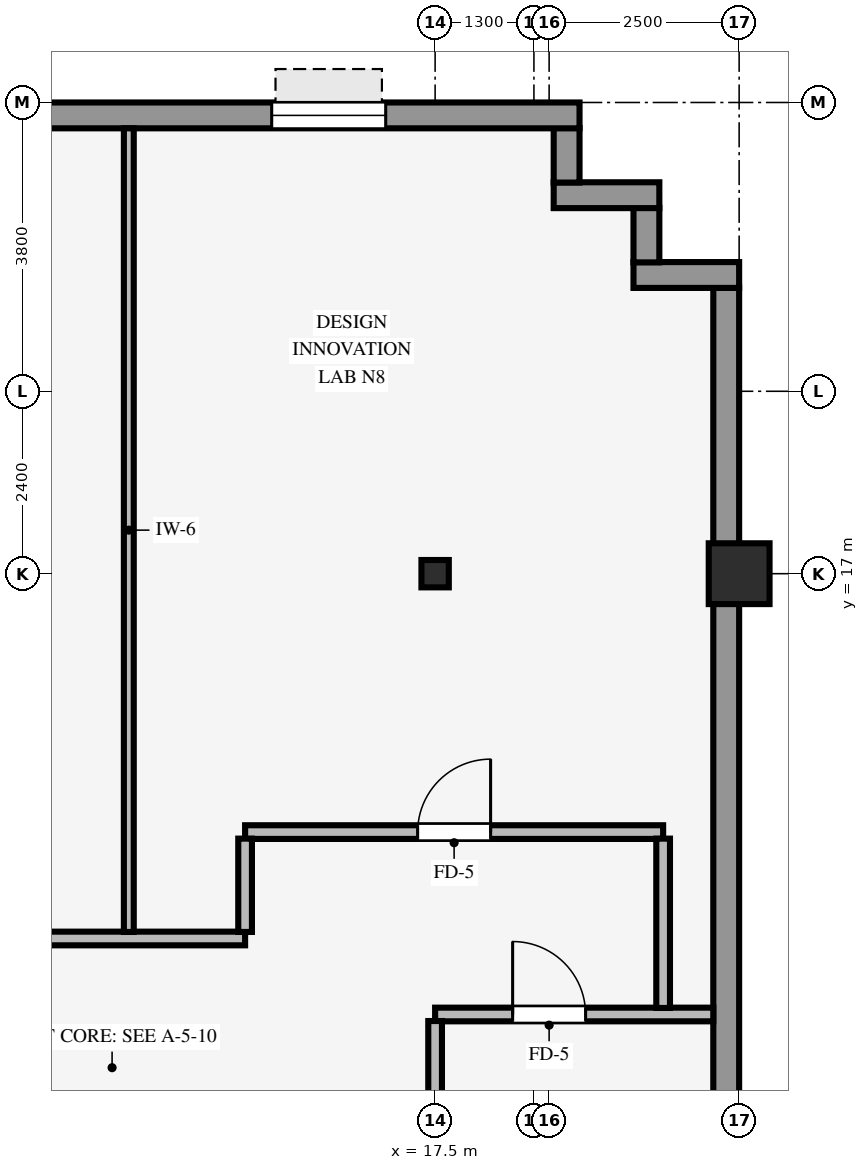
"""IFC4 building model, lengths in metres.
Left out: names, types, materials, properties, quantities, classifications, styles, units other than length and angle.
Written with IfcOpenShell. Run it as: python <this file> out.ifc"""

import sys

from ifc_helpers import new_model, si_unit, direction, frame, frame_2d, origin, origin_2d, place, context, subcontext, project, spatial, rectangle, hollow_rectangle, i_section, extrude, source, transform, mapped, element, fill, save


model = new_model("IFC4")
c1 = context("Model", 3, precision=1e-05, world=origin(), true_north=direction((0.0, 1.0)))
c2 = subcontext(c1, "Body", "Model", "MODEL_VIEW")
j1 = project(units=[si_unit("LENGTHUNIT", "METRE"), si_unit("PLANEANGLEUNIT", "RADIAN")], contexts=[c1])
p1 = place(None, origin())
s1 = spatial("IfcSite", under=j1, at=p1, CompositionType="ELEMENT")
p2 = place(p1, origin())
s2 = spatial("IfcBuilding", under=s1, at=p2, CompositionType="ELEMENT")
p3 = place(p2, frame((0.0, 0.0, 64.1)))
s3 = spatial("IfcBuildingStorey", under=s2, at=p3, CompositionType="ELEMENT", Elevation=64.1)
p4 = place(p3, frame((21.5, 17.0, 0.0), z_axis=(0.0, 0.0, 1.0), x_axis=(1.0, 0.0, 0.0)))
e1 = element("IfcColumn", 1, at=p4, inside=s3, PredefinedType="COLUMN", context=c2, shape_type="SweptSolid", body=[
    extrude(hollow_rectangle(XDim=0.8, YDim=0.8, WallThickness=0.055, InnerFilletRadius=0.055, OuterFilletRadius=0.11, at=origin_2d()), origin(), (0.0, 0.0, 1.0), 3.37),
])
p5 = place(p3, frame((17.5, 17.0, 0.0), z_axis=(0.0, 0.0, 1.0), x_axis=(1.0, 0.0, 0.0)))
e2 = element("IfcColumn", 2, at=p5, inside=s3, PredefinedType="COLUMN", context=c2, shape_type="SweptSolid", body=[
    extrude(i_section(OverallWidth=0.36, OverallDepth=0.36, WebThickness=0.021, FlangeThickness=0.021, FilletRadius=0.018, at=origin_2d()), origin(), (0.0, 0.0, 1.0), 3.37),
])
p6 = place(p3, frame((21.33, -20.764, 0.0), z_axis=(0.0, 0.0, 1.0), x_axis=(0.0, 1.0, 0.0)))
e3 = element("IfcWall", 3, at=p6, inside=s3, PredefinedType="STANDARD", context=c2, shape_type="SweptSolid", body=[
    extrude(rectangle(XDim=41.528, YDim=0.34, at=frame_2d((20.764, 0.0))), origin(), (0.0, 0.0, 1.0), 2.705),
])
p7 = place(p6, frame((12.202, 0.0, 0.8)))
e4 = element("IfcOpeningElement", 4, at=p7, cuts=e3, PredefinedType="OPENING", context=c2, shape_type="SweptSolid", body=[
    extrude(rectangle(XDim=2.3, YDim=1.62, at=frame_2d((1.15, 0.81))), frame((0.0, 0.18, 0.0), z_axis=(0.0, -1.0, 0.0), x_axis=(1.0, 0.0, 0.0)), (0.0, 0.0, 1.0), 0.36),
])
p8 = place(p6, frame((17.144, 0.0, 0.8)))
e5 = element("IfcOpeningElement", 5, at=p8, cuts=e3, PredefinedType="OPENING", context=c2, shape_type="SweptSolid", body=[
    extrude(rectangle(XDim=2.3, YDim=1.62, at=frame_2d((1.15, 0.81))), frame((0.0, 0.18, 0.0), z_axis=(0.0, -1.0, 0.0), x_axis=(1.0, 0.0, 0.0)), (0.0, 0.0, 1.0), 0.36),
])
p9 = place(p6, frame((22.084, 0.0, 0.8)))
e6 = element("IfcOpeningElement", 6, at=p9, cuts=e3, PredefinedType="OPENING", context=c2, shape_type="SweptSolid", body=[
    extrude(rectangle(XDim=2.3, YDim=1.62, at=frame_2d((1.15, 0.81))), frame((0.0, 0.18, 0.0), z_axis=(0.0, -1.0, 0.0), x_axis=(1.0, 0.0, 0.0)), (0.0, 0.0, 1.0), 0.36),
])
p10 = place(p6, frame((27.025, 0.0, 0.8)))
e7 = element("IfcOpeningElement", 7, at=p10, cuts=e3, PredefinedType="OPENING", context=c2, shape_type="SweptSolid", body=[
    extrude(rectangle(XDim=2.3, YDim=1.62, at=frame_2d((1.15, 0.81))), frame((0.0, 0.18, 0.0), z_axis=(0.0, -1.0, 0.0), x_axis=(1.0, 0.0, 0.0)), (0.0, 0.0, 1.0), 0.36),
])
p11 = place(p3, frame((20.11, 20.93, 0.0), z_axis=(0.0, 0.0, 1.0), x_axis=(1.0, 0.0, 0.0)))
e8 = element("IfcWall", 8, at=p11, inside=s3, PredefinedType="STANDARD", context=c2, shape_type="SweptSolid", body=[
    extrude(rectangle(XDim=1.39, YDim=0.34, at=frame_2d((0.695, 0.0))), origin(), (0.0, 0.0, 1.0), 3.36),
])
p12 = place(p3, frame((20.28, 21.096, 0.0), z_axis=(0.0, 0.0, 1.0), x_axis=(0.0, 1.0, 0.0)))
e9 = element("IfcWall", 9, at=p12, inside=s3, PredefinedType="STANDARD", context=c2, shape_type="SweptSolid", body=[
    extrude(rectangle(XDim=0.718, YDim=0.34, at=frame_2d((0.359, 0.0))), origin(), (0.0, 0.0, 1.0), 3.36),
])
p13 = place(p3, frame((19.06, 21.98, 0.0), z_axis=(0.0, 0.0, 1.0), x_axis=(1.0, 0.0, 0.0)))
e10 = element("IfcWall", 10, at=p13, inside=s3, PredefinedType="STANDARD", context=c2, shape_type="SweptSolid", body=[
    extrude(rectangle(XDim=1.39, YDim=0.34, at=frame_2d((0.695, 0.0))), origin(), (0.0, 0.0, 1.0), 3.36),
])
p14 = place(p3, frame((19.23, 22.146, 0.0), z_axis=(0.0, 0.0, 1.0), x_axis=(0.0, 1.0, 0.0)))
e11 = element("IfcWall", 11, at=p14, inside=s3, PredefinedType="STANDARD", context=c2, shape_type="SweptSolid", body=[
    extrude(rectangle(XDim=0.718, YDim=0.34, at=frame_2d((0.359, 0.0))), origin(), (0.0, 0.0, 1.0), 3.36),
])
p15 = place(p3, frame((-19.4, 23.03, 0.0), z_axis=(0.0, 0.0, 1.0), x_axis=(1.0, 0.0, 0.0)))
e12 = element("IfcWall", 12, at=p15, inside=s3, PredefinedType="STANDARD", context=c2, shape_type="SweptSolid", body=[
    extrude(rectangle(XDim=38.8, YDim=0.34, at=frame_2d((19.4, 0.0))), origin(), (0.0, 0.0, 1.0), 2.705),
])
p16 = place(p15, frame((1.65, 0.0, 0.8)))
e13 = element("IfcOpeningElement", 13, at=p16, cuts=e12, PredefinedType="OPENING", context=c2, shape_type="SweptSolid", body=[
    extrude(rectangle(XDim=1.5, YDim=1.6, at=frame_2d((0.75, 0.8))), frame((0.0, 0.18, 0.0), z_axis=(0.0, -1.0, 0.0), x_axis=(1.0, 0.0, 0.0)), (0.0, 0.0, 1.0), 0.36),
])
p17 = place(p15, frame((7.15, 0.0, 0.8)))
e14 = element("IfcOpeningElement", 14, at=p17, cuts=e12, PredefinedType="OPENING", context=c2, shape_type="SweptSolid", body=[
    extrude(rectangle(XDim=1.5, YDim=1.6, at=frame_2d((0.75, 0.8))), frame((0.0, 0.18, 0.0), z_axis=(0.0, -1.0, 0.0), x_axis=(1.0, 0.0, 0.0)), (0.0, 0.0, 1.0), 0.36),
])
p18 = place(p15, frame((11.75, 0.0, 0.8)))
e15 = element("IfcOpeningElement", 15, at=p18, cuts=e12, PredefinedType="OPENING", context=c2, shape_type="SweptSolid", body=[
    extrude(rectangle(XDim=1.5, YDim=1.6, at=frame_2d((0.75, 0.8))), frame((0.0, 0.18, 0.0), z_axis=(0.0, -1.0, 0.0), x_axis=(1.0, 0.0, 0.0)), (0.0, 0.0, 1.0), 0.36),
])
p19 = place(p15, frame((16.35, 0.0, 0.8)))
e16 = element("IfcOpeningElement", 16, at=p19, cuts=e12, PredefinedType="OPENING", context=c2, shape_type="SweptSolid", body=[
    extrude(rectangle(XDim=1.5, YDim=1.6, at=frame_2d((0.75, 0.8))), frame((0.0, 0.18, 0.0), z_axis=(0.0, -1.0, 0.0), x_axis=(1.0, 0.0, 0.0)), (0.0, 0.0, 1.0), 0.36),
])
p20 = place(p15, frame((20.95, 0.0, 0.8)))
e17 = element("IfcOpeningElement", 17, at=p20, cuts=e12, PredefinedType="OPENING", context=c2, shape_type="SweptSolid", body=[
    extrude(rectangle(XDim=1.5, YDim=1.6, at=frame_2d((0.75, 0.8))), frame((0.0, 0.18, 0.0), z_axis=(0.0, -1.0, 0.0), x_axis=(1.0, 0.0, 0.0)), (0.0, 0.0, 1.0), 0.36),
])
p21 = place(p15, frame((25.55, 0.0, 0.8)))
e18 = element("IfcOpeningElement", 18, at=p21, cuts=e12, PredefinedType="OPENING", context=c2, shape_type="SweptSolid", body=[
    extrude(rectangle(XDim=1.5, YDim=1.6, at=frame_2d((0.75, 0.8))), frame((0.0, 0.18, 0.0), z_axis=(0.0, -1.0, 0.0), x_axis=(1.0, 0.0, 0.0)), (0.0, 0.0, 1.0), 0.36),
])
p22 = place(p15, frame((30.15, 0.0, 0.8)))
e19 = element("IfcOpeningElement", 19, at=p22, cuts=e12, PredefinedType="OPENING", context=c2, shape_type="SweptSolid", body=[
    extrude(rectangle(XDim=1.5, YDim=1.6, at=frame_2d((0.75, 0.8))), frame((0.0, 0.18, 0.0), z_axis=(0.0, -1.0, 0.0), x_axis=(1.0, 0.0, 0.0)), (0.0, 0.0, 1.0), 0.36),
])
p23 = place(p15, frame((34.75, 0.0, 0.8)))
e20 = element("IfcOpeningElement", 20, at=p23, cuts=e12, PredefinedType="OPENING", context=c2, shape_type="SweptSolid", body=[
    extrude(rectangle(XDim=1.5, YDim=1.6, at=frame_2d((0.75, 0.8))), frame((0.0, 0.18, 0.0), z_axis=(0.0, -1.0, 0.0), x_axis=(1.0, 0.0, 0.0)), (0.0, 0.0, 1.0), 0.36),
])
p24 = place(p3, frame((17.5, 11.2, 0.0), z_axis=(0.0, 0.0, 1.0), x_axis=(1.0, 0.0, 0.0)))
e21 = element("IfcWall", 21, at=p24, inside=s3, PredefinedType="PARTITIONING", context=c2, shape_type="SweptSolid", body=[
    extrude(rectangle(XDim=3.66, YDim=0.18, at=frame_2d((1.83, 0.0))), origin(), (0.0, 0.0, 1.0), 3.36),
])
p25 = place(p24, frame((1.02, 0.0, 0.0)))
e22 = element("IfcOpeningElement", 22, at=p25, cuts=e21, PredefinedType="OPENING", context=c2, shape_type="SweptSolid", body=[
    extrude(rectangle(XDim=0.96, YDim=2.1, at=frame_2d((0.48, 1.05))), frame((0.0, 0.1, 0.0), z_axis=(0.0, -1.0, 0.0), x_axis=(1.0, 0.0, 0.0)), (0.0, 0.0, 1.0), 0.2),
])
p26 = place(p3, frame((-15.0, 12.2, 0.0), z_axis=(0.0, 0.0, 1.0), x_axis=(1.0, 0.0, 0.0)))
e23 = element("IfcWall", 23, at=p26, inside=s3, PredefinedType="PARTITIONING", context=c2, shape_type="SweptSolid", body=[
    extrude(rectangle(XDim=30.0, YDim=0.18, at=frame_2d((15.0, 0.0))), origin(), (0.0, 0.0, 1.0), 3.36),
])
p27 = place(p26, frame((2.195, 0.0, 0.0)))
e24 = element("IfcOpeningElement", 24, at=p27, cuts=e23, PredefinedType="OPENING", context=c2, shape_type="SweptSolid", body=[
    extrude(rectangle(XDim=0.96, YDim=2.1, at=frame_2d((0.48, 1.05))), frame((0.0, 0.1, 0.0), z_axis=(0.0, -1.0, 0.0), x_axis=(1.0, 0.0, 0.0)), (0.0, 0.0, 1.0), 0.2),
])
p28 = place(p26, frame((16.395, 0.0, 0.0)))
e25 = element("IfcOpeningElement", 25, at=p28, cuts=e23, PredefinedType="OPENING", context=c2, shape_type="SweptSolid", body=[
    extrude(rectangle(XDim=0.96, YDim=2.1, at=frame_2d((0.48, 1.05))), frame((0.0, 0.1, 0.0), z_axis=(0.0, -1.0, 0.0), x_axis=(1.0, 0.0, 0.0)), (0.0, 0.0, 1.0), 0.2),
])
p29 = place(p26, frame((21.62, 0.0, 0.0)))
e26 = element("IfcOpeningElement", 26, at=p29, cuts=e23, PredefinedType="OPENING", context=c2, shape_type="SweptSolid", body=[
    extrude(rectangle(XDim=0.96, YDim=2.1, at=frame_2d((0.48, 1.05))), frame((0.0, 0.1, 0.0), z_axis=(0.0, -1.0, 0.0), x_axis=(1.0, 0.0, 0.0)), (0.0, 0.0, 1.0), 0.2),
])
p30 = place(p26, frame((7.33, 0.0, 0.0)))
e27 = element("IfcOpeningElement", 27, at=p30, cuts=e23, PredefinedType="OPENING", context=c2, shape_type="SweptSolid", body=[
    extrude(rectangle(XDim=0.96, YDim=2.1, at=frame_2d((0.48, 1.05))), frame((0.0, 0.1, 0.0), z_axis=(0.0, -1.0, 0.0), x_axis=(1.0, 0.0, 0.0)), (0.0, 0.0, 1.0), 0.2),
])
p31 = place(p26, frame((26.08, 0.0, 0.0)))
e28 = element("IfcOpeningElement", 28, at=p31, cuts=e23, PredefinedType="OPENING", context=c2, shape_type="SweptSolid", body=[
    extrude(rectangle(XDim=0.96, YDim=2.1, at=frame_2d((0.48, 1.05))), frame((0.0, 0.1, 0.0), z_axis=(0.0, -1.0, 0.0), x_axis=(1.0, 0.0, 0.0)), (0.0, 0.0, 1.0), 0.2),
])
p32 = place(p26, frame((12.52, 0.0, 0.0)))
e29 = element("IfcOpeningElement", 29, at=p32, cuts=e23, PredefinedType="OPENING", context=c2, shape_type="SweptSolid", body=[
    extrude(rectangle(XDim=0.96, YDim=2.1, at=frame_2d((0.48, 1.05))), frame((0.0, 0.1, 0.0), z_axis=(0.0, -1.0, 0.0), x_axis=(1.0, 0.0, 0.0)), (0.0, 0.0, 1.0), 0.2),
])
p33 = place(p3, frame((15.0, 13.6, 0.0), z_axis=(0.0, 0.0, 1.0), x_axis=(1.0, 0.0, 0.0)))
e30 = element("IfcWall", 30, at=p33, inside=s3, PredefinedType="PARTITIONING", context=c2, shape_type="SweptSolid", body=[
    extrude(rectangle(XDim=5.5, YDim=0.18, at=frame_2d((2.75, 0.0))), origin(), (0.0, 0.0, 1.0), 2.942),
])
p34 = place(p33, frame((2.27, 0.0, 0.0)))
e31 = element("IfcOpeningElement", 31, at=p34, cuts=e30, PredefinedType="OPENING", context=c2, shape_type="SweptSolid", body=[
    extrude(rectangle(XDim=0.96, YDim=2.1, at=frame_2d((0.48, 1.05))), frame((0.0, 0.1, 0.0), z_axis=(0.0, -1.0, 0.0), x_axis=(1.0, 0.0, 0.0)), (0.0, 0.0, 1.0), 0.2),
])
p35 = place(p3, frame((13.47, 12.286, 0.0), z_axis=(0.0, 0.0, 1.0), x_axis=(0.0, 1.0, 0.0)))
e32 = element("IfcWall", 32, at=p35, inside=s3, PredefinedType="PARTITIONING", context=c2, shape_type="SweptSolid", body=[
    extrude(rectangle(XDim=10.574, YDim=0.13, at=frame_2d((5.287, 0.0))), origin(), (0.0, 0.0, 1.0), 3.36),
])
p36 = place(p3, frame((15.0, 12.286, 0.0), z_axis=(0.0, 0.0, 1.0), x_axis=(0.0, 1.0, 0.0)))
e33 = element("IfcWall", 33, at=p36, inside=s3, PredefinedType="PARTITIONING", context=c2, shape_type="SweptSolid", body=[
    extrude(rectangle(XDim=1.228, YDim=0.18, at=frame_2d((0.614, 0.0))), origin(), (0.0, 0.0, 1.0), 3.36),
])
p37 = place(p3, frame((17.5, 10.146, 0.0), z_axis=(0.0, 0.0, 1.0), x_axis=(0.0, 1.0, 0.0)))
e34 = element("IfcWall", 34, at=p37, inside=s3, PredefinedType="PARTITIONING", context=c2, shape_type="SweptSolid", body=[
    extrude(rectangle(XDim=0.968, YDim=0.18, at=frame_2d((0.484, 0.0))), origin(), (0.0, 0.0, 1.0), 2.738),
])
p38 = place(p3, frame((20.5, 11.286, 0.0), z_axis=(0.0, 0.0, 1.0), x_axis=(0.0, 1.0, 0.0)))
e35 = element("IfcWall", 35, at=p38, inside=s3, PredefinedType="PARTITIONING", context=c2, shape_type="SweptSolid", body=[
    extrude(rectangle(XDim=2.228, YDim=0.18, at=frame_2d((1.114, 0.0))), origin(), (0.0, 0.0, 1.0), 3.36),
])
m1 = source(origin(), c2, "Body", "SweptSolid", [
    extrude(rectangle(XDim=1.5, YDim=1.6, at=frame_2d((0.75, 0.8))), frame((0.0, 0.03, 0.0), z_axis=(0.0, -1.0, 0.0), x_axis=(1.0, 0.0, 0.0)), (0.0, 0.0, 1.0), 0.06),
])
p39 = place(p23, origin())
e36 = element("IfcWindow", 36, at=p39, inside=s3, PartitioningType="SINGLE_PANEL", PredefinedType="WINDOW", context=c2, shape_type="MappedRepresentation", body=[
    mapped(m1, transform((0.0, 0.0, 0.0), scale=1.0)),
])
fill(e20, e36)
m2 = source(origin(), c2, "Body", "SweptSolid", [
    extrude(rectangle(XDim=0.96, YDim=2.1, at=frame_2d((0.48, 1.05))), frame((0.0, 0.025, 0.0), z_axis=(0.0, -1.0, 0.0), x_axis=(1.0, 0.0, 0.0)), (0.0, 0.0, 1.0), 0.05),
])
p40 = place(p34, origin())
e37 = element("IfcDoor", 37, at=p40, inside=s3, OperationType="SINGLE_SWING_RIGHT", PredefinedType="DOOR", context=c2, shape_type="MappedRepresentation", body=[
    mapped(m2, transform((0.0, 0.0, 0.0), scale=1.0)),
])
fill(e31, e37)
p41 = place(p25, origin())
e38 = element("IfcDoor", 38, at=p41, inside=s3, OperationType="SINGLE_SWING_LEFT", PredefinedType="DOOR", context=c2, shape_type="MappedRepresentation", body=[
    mapped(m2, transform((0.0, 0.0, 0.0), scale=1.0)),
])
fill(e22, e38)
save(model, sys.argv[1])
